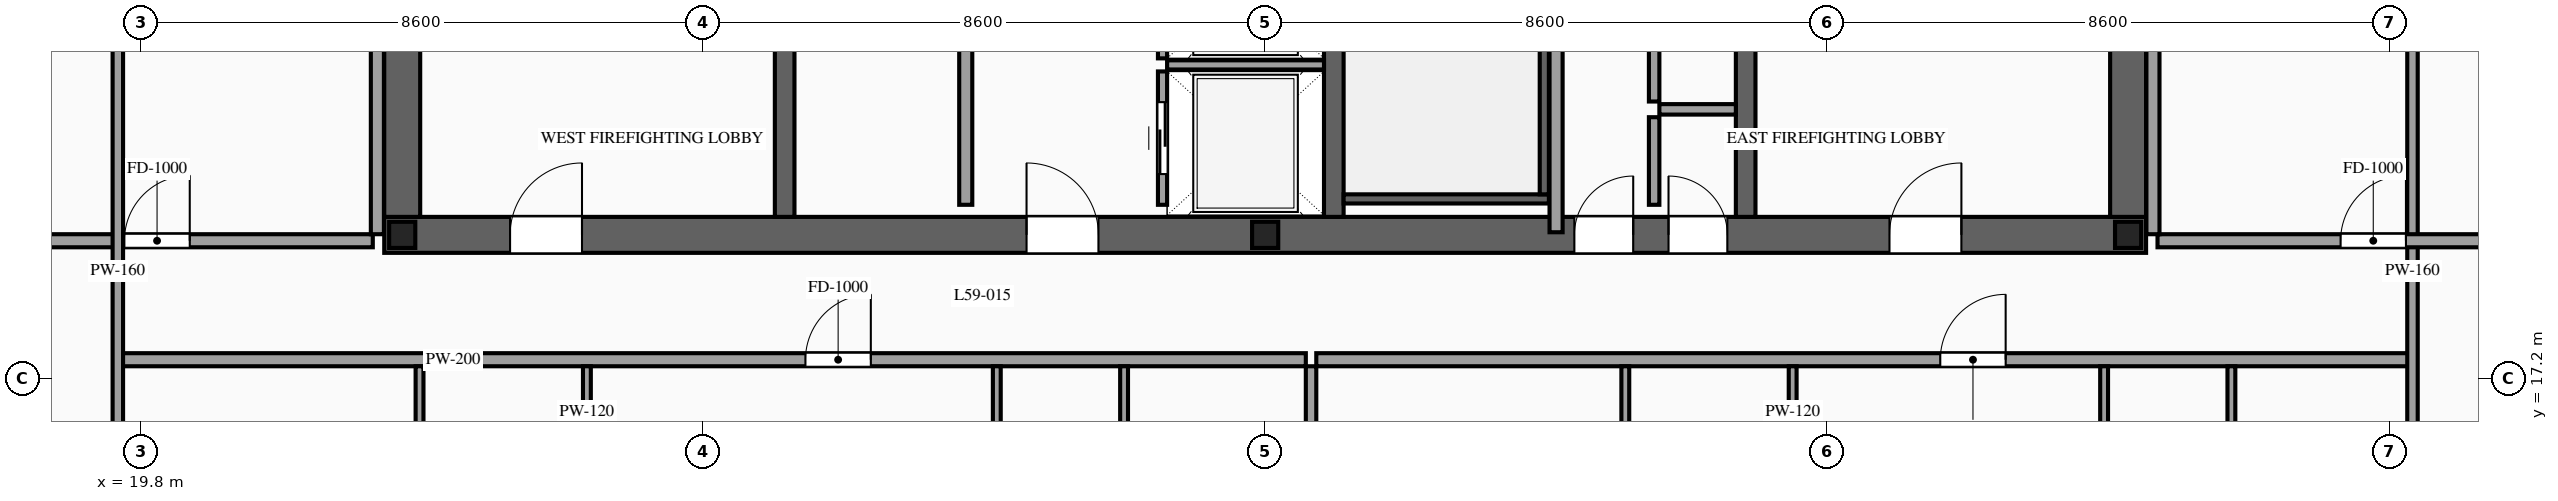
"""IFC4 building model, lengths in metres.
Left out: names, types, materials, properties, quantities, classifications, styles, units other than length and angle.
Written with IfcOpenShell. Run it as: python <this file> out.ifc"""

import sys

from ifc_helpers import new_model, si_unit, direction, frame, frame_2d, origin, origin_2d, place, context, subcontext, project, spatial, rectangle, i_section, extrude, source, transform, mapped, element, fill, save


model = new_model("IFC4")
c1 = context("Model", 3, precision=1e-05, world=origin(), true_north=direction((0.0, 1.0)))
c2 = subcontext(c1, "Body", "Model", "MODEL_VIEW")
j1 = project(units=[si_unit("LENGTHUNIT", "METRE"), si_unit("PLANEANGLEUNIT", "RADIAN")], contexts=[c1])
p1 = place(None, origin())
s1 = spatial("IfcSite", under=j1, at=p1, CompositionType="ELEMENT")
p2 = place(p1, origin())
s2 = spatial("IfcBuilding", under=s1, at=p2, CompositionType="ELEMENT")
p3 = place(p2, frame((0.0, 0.0, 224.1)))
s3 = spatial("IfcBuildingStorey", under=s2, at=p3, CompositionType="ELEMENT", Elevation=224.1)
p4 = place(p3, frame((23.525, 19.4, 0.0), z_axis=(0.0, 0.0, 1.0), x_axis=(1.0, 0.0, 0.0)))
e1 = element("IfcWall", 1, at=p4, inside=s3, PredefinedType="SHEAR", context=c2, shape_type="SweptSolid", body=[
    extrude(rectangle(XDim=26.95, YDim=0.55, at=frame_2d((13.475, 0.0))), origin(), (0.0, 0.0, 1.0), 3.5),
])
p5 = place(p4, frame((1.925, 0.0, 0.0)))
e2 = element("IfcOpeningElement", 2, at=p5, cuts=e1, PredefinedType="OPENING", context=c2, shape_type="SweptSolid", body=[
    extrude(rectangle(XDim=1.1, YDim=2.2, at=frame_2d((0.55, 1.1))), frame((0.0, 0.29, 0.0), z_axis=(0.0, -1.0, 0.0), x_axis=(1.0, 0.0, 0.0)), (0.0, 0.0, 1.0), 0.58),
])
p6 = place(p4, frame((9.825, 0.0, 0.0)))
e3 = element("IfcOpeningElement", 3, at=p6, cuts=e1, PredefinedType="OPENING", context=c2, shape_type="SweptSolid", body=[
    extrude(rectangle(XDim=1.1, YDim=2.2, at=frame_2d((0.55, 1.1))), frame((0.0, 0.29, 0.0), z_axis=(0.0, -1.0, 0.0), x_axis=(1.0, 0.0, 0.0)), (0.0, 0.0, 1.0), 0.58),
])
p7 = place(p4, frame((23.025, 0.0, 0.0)))
e4 = element("IfcOpeningElement", 4, at=p7, cuts=e1, PredefinedType="OPENING", context=c2, shape_type="SweptSolid", body=[
    extrude(rectangle(XDim=1.1, YDim=2.2, at=frame_2d((0.55, 1.1))), frame((0.0, 0.29, 0.0), z_axis=(0.0, -1.0, 0.0), x_axis=(1.0, 0.0, 0.0)), (0.0, 0.0, 1.0), 0.58),
])
p8 = place(p4, frame((19.645, 0.0, 0.0)))
e5 = element("IfcOpeningElement", 5, at=p8, cuts=e1, PredefinedType="OPENING", context=c2, shape_type="SweptSolid", body=[
    extrude(rectangle(XDim=0.9, YDim=2.15, at=frame_2d((0.45, 1.075))), frame((0.0, 0.29, 0.0), z_axis=(0.0, -1.0, 0.0), x_axis=(1.0, 0.0, 0.0)), (0.0, 0.0, 1.0), 0.58),
])
p9 = place(p4, frame((18.205, 0.0, 0.0)))
e6 = element("IfcOpeningElement", 6, at=p9, cuts=e1, PredefinedType="OPENING", context=c2, shape_type="SweptSolid", body=[
    extrude(rectangle(XDim=0.9, YDim=2.15, at=frame_2d((0.45, 1.075))), frame((0.0, 0.29, 0.0), z_axis=(0.0, -1.0, 0.0), x_axis=(1.0, 0.0, 0.0)), (0.0, 0.0, 1.0), 0.58),
])
m1 = source(origin(), c2, "Body", "SweptSolid", [
    extrude(rectangle(XDim=12.25, YDim=0.55, at=frame_2d((6.125, 0.0))), origin(), (0.0, 0.0, 1.0), 3.5),
])
for number, where, z_axis, x_axis in (
    (7, (23.8, 19.675, 0.0), (0.0, 0.0, 1.0), (0.0, 1.0, 0.0)),
    (8, (50.2, 19.675, 0.0), (0.0, 0.0, 1.0), (0.0, 1.0, 0.0)),
):
    element("IfcWall", number, at=place(p3, frame(where, z_axis=z_axis, x_axis=x_axis)), inside=s3, PredefinedType="SHEAR", context=c2, shape_type="MappedRepresentation", body=[
        mapped(m1, transform((0.0, 0.0, 0.0), scale=1.0)),
    ])
m2 = source(origin(), c2, "Body", "SweptSolid", [
    extrude(rectangle(XDim=12.25, YDim=0.3, at=frame_2d((6.125, 0.0))), origin(), (0.0, 0.0, 1.0), 3.5),
])
for number, where, z_axis, x_axis in (
    (9, (29.65, 19.675, 0.0), (0.0, 0.0, 1.0), (0.0, 1.0, 0.0)),
    (10, (38.05, 19.675, 0.0), (0.0, 0.0, 1.0), (0.0, 1.0, 0.0)),
    (11, (44.35, 19.675, 0.0), (0.0, 0.0, 1.0), (0.0, 1.0, 0.0)),
):
    element("IfcWall", number, at=place(p3, frame(where, z_axis=z_axis, x_axis=x_axis)), inside=s3, PredefinedType="SOLIDWALL", context=c2, shape_type="MappedRepresentation", body=[
        mapped(m2, transform((0.0, 0.0, 0.0), scale=1.0)),
    ])
m3 = source(origin(), c2, "Body", "SweptSolid", [
    extrude(i_section(OverallWidth=0.4, OverallDepth=0.4, WebThickness=0.013, FlangeThickness=0.021, at=origin_2d()), origin(), (0.0, 0.0, 1.0), 3.5),
])
for number, where, z_axis, x_axis in (
    (12, (23.8, 19.4, 0.0), (0.0, 0.0, 1.0), (1.0, 0.0, 0.0)),
    (13, (37.0, 19.4, 0.0), (0.0, 0.0, 1.0), (1.0, 0.0, 0.0)),
    (14, (50.2, 19.4, 0.0), (0.0, 0.0, 1.0), (1.0, 0.0, 0.0)),
):
    element("IfcColumn", number, at=place(p3, frame(where, z_axis=z_axis, x_axis=x_axis)), inside=s3, PredefinedType="COLUMN", context=c2, shape_type="MappedRepresentation", body=[
        mapped(m3, transform((0.0, 0.0, 0.0), scale=1.0)),
    ])
p10 = place(p3, frame((35.43, 19.86, 0.0), z_axis=(0.0, 0.0, 1.0), x_axis=(0.0, 1.0, 0.0)))
e15 = element("IfcWall", 15, at=p10, inside=s3, PredefinedType="SOLIDWALL", context=c2, shape_type="SweptSolid", body=[
    extrude(rectangle(XDim=2.04, YDim=0.14, at=frame_2d((1.02, 0.0))), origin(), (0.0, 0.0, 1.0), 3.28),
])
p11 = place(p10, frame((0.47, 0.0, 0.0)))
e16 = element("IfcOpeningElement", 16, at=p11, cuts=e15, PredefinedType="OPENING", context=c2, shape_type="SweptSolid", body=[
    extrude(rectangle(XDim=1.1, YDim=2.2, at=frame_2d((0.55, 1.1))), frame((0.0, 0.085, 0.0), z_axis=(0.0, -1.0, 0.0), x_axis=(1.0, 0.0, 0.0)), (0.0, 0.0, 1.0), 0.17),
])
m4 = source(origin(), c2, "Body", "SweptSolid", [
    extrude(rectangle(XDim=2.4, YDim=0.14, at=frame_2d((1.2, 0.0))), origin(), (0.0, 0.0, 1.0), 3.28),
])
p12 = place(p3, frame((35.5, 22.0, 0.0), z_axis=(0.0, 0.0, 1.0), x_axis=(1.0, 0.0, 0.0)))
e17 = element("IfcWall", 17, at=p12, inside=s3, PredefinedType="SOLIDWALL", context=c2, shape_type="MappedRepresentation", body=[
    mapped(m4, transform((0.0, 0.0, 0.0), scale=1.0)),
])
p13 = place(p3, frame((35.43, 22.1, 0.0), z_axis=(0.0, 0.0, 1.0), x_axis=(0.0, 1.0, 0.0)))
e18 = element("IfcWall", 18, at=p13, inside=s3, PredefinedType="SOLIDWALL", context=c2, shape_type="SweptSolid", body=[
    extrude(rectangle(XDim=2.2, YDim=0.14, at=frame_2d((1.1, 0.0))), origin(), (0.0, 0.0, 1.0), 3.28),
])
p14 = place(p13, frame((0.55, 0.0, 0.0)))
e19 = element("IfcOpeningElement", 19, at=p14, cuts=e18, PredefinedType="OPENING", context=c2, shape_type="SweptSolid", body=[
    extrude(rectangle(XDim=1.1, YDim=2.2, at=frame_2d((0.55, 1.1))), frame((0.0, 0.085, 0.0), z_axis=(0.0, -1.0, 0.0), x_axis=(1.0, 0.0, 0.0)), (0.0, 0.0, 1.0), 0.17),
])
m5 = source(origin(), c2, "Body", "SweptSolid", [
    extrude(rectangle(XDim=3.14, YDim=0.14, at=frame_2d((1.57, 0.0))), origin(), (0.0, 0.0, 1.0), 3.28),
])
p15 = place(p3, frame((38.2, 19.95, 0.0), z_axis=(0.0, 0.0, 1.0), x_axis=(1.0, 0.0, 0.0)))
e20 = element("IfcWall", 20, at=p15, inside=s3, PredefinedType="SOLIDWALL", context=c2, shape_type="MappedRepresentation", body=[
    mapped(m5, transform((0.0, 0.0, 0.0), scale=1.0)),
])
m6 = source(origin(), c2, "Body", "SweptSolid", [
    extrude(rectangle(XDim=8.94, YDim=0.14, at=frame_2d((4.47, 0.0))), origin(), (0.0, 0.0, 1.0), 3.28),
])
p16 = place(p3, frame((41.27, 20.02, 0.0), z_axis=(0.0, 0.0, 1.0), x_axis=(0.0, 1.0, 0.0)))
e21 = element("IfcWall", 21, at=p16, inside=s3, PredefinedType="SOLIDWALL", context=c2, shape_type="MappedRepresentation", body=[
    mapped(m6, transform((0.0, 0.0, 0.0), scale=1.0)),
])
p17 = place(p3, frame((32.42, 19.86, 0.0), z_axis=(0.0, 0.0, 1.0), x_axis=(0.0, 1.0, 0.0)))
e22 = element("IfcWall", 22, at=p17, inside=s3, PredefinedType="PARTITIONING", context=c2, shape_type="SweptSolid", body=[
    extrude(rectangle(XDim=5.84, YDim=0.2, at=frame_2d((2.92, 0.0))), origin(), (0.0, 0.0, 1.0), 3.28),
])
p18 = place(p17, frame((2.47, 0.0, 0.0)))
e23 = element("IfcOpeningElement", 23, at=p18, cuts=e22, PredefinedType="OPENING", context=c2, shape_type="SweptSolid", body=[
    extrude(rectangle(XDim=0.9, YDim=2.15, at=frame_2d((0.45, 1.075))), frame((0.0, 0.115, 0.0), z_axis=(0.0, -1.0, 0.0), x_axis=(1.0, 0.0, 0.0)), (0.0, 0.0, 1.0), 0.23),
])
m7 = source(origin(), c2, "Body", "SweptSolid", [
    extrude(rectangle(XDim=1.34, YDim=0.16, at=frame_2d((0.67, 0.0))), origin(), (0.0, 0.0, 1.0), 3.28),
])
p19 = place(p3, frame((42.95, 19.86, 0.0), z_axis=(0.0, 0.0, 1.0), x_axis=(0.0, 1.0, 0.0)))
e24 = element("IfcWall", 24, at=p19, inside=s3, PredefinedType="PARTITIONING", context=c2, shape_type="MappedRepresentation", body=[
    mapped(m7, transform((0.0, 0.0, 0.0), scale=1.0)),
])
m8 = source(origin(), c2, "Body", "SweptSolid", [
    extrude(rectangle(XDim=1.17, YDim=0.16, at=frame_2d((0.585, 0.0))), origin(), (0.0, 0.0, 1.0), 3.28),
])
p20 = place(p3, frame((43.03, 21.32, 0.0), z_axis=(0.0, 0.0, 1.0), x_axis=(1.0, 0.0, 0.0)))
e25 = element("IfcWall", 25, at=p20, inside=s3, PredefinedType="PARTITIONING", context=c2, shape_type="MappedRepresentation", body=[
    mapped(m8, transform((0.0, 0.0, 0.0), scale=1.0)),
])
m9 = source(origin(), c2, "Body", "SweptSolid", [
    extrude(rectangle(XDim=12.72, YDim=0.2, at=frame_2d((6.36, 0.0))), origin(), (0.0, 0.0, 1.0), 3.28),
])
p21 = place(p3, frame((41.45, 19.44, 0.0), z_axis=(0.0, 0.0, 1.0), x_axis=(0.0, 1.0, 0.0)))
e26 = element("IfcWall", 26, at=p21, inside=s3, PredefinedType="PARTITIONING", context=c2, shape_type="MappedRepresentation", body=[
    mapped(m9, transform((0.0, 0.0, 0.0), scale=1.0)),
])
m10 = source(origin(), c2, "Body", "SweptSolid", [
    extrude(rectangle(XDim=10.72, YDim=0.16, at=frame_2d((5.36, 0.0))), origin(), (0.0, 0.0, 1.0), 3.28),
])
p22 = place(p3, frame((42.95, 21.44, 0.0), z_axis=(0.0, 0.0, 1.0), x_axis=(0.0, 1.0, 0.0)))
e27 = element("IfcWall", 27, at=p22, inside=s3, PredefinedType="PARTITIONING", context=c2, shape_type="MappedRepresentation", body=[
    mapped(m10, transform((0.0, 0.0, 0.0), scale=1.0)),
])
p23 = place(p3, frame((19.44, 17.49, 0.0), z_axis=(0.0, 0.0, 1.0), x_axis=(1.0, 0.0, 0.0)))
e28 = element("IfcWall", 28, at=p23, inside=s3, PredefinedType="PARTITIONING", context=c2, shape_type="SweptSolid", body=[
    extrude(rectangle(XDim=18.182, YDim=0.2, at=frame_2d((9.091, 0.0))), origin(), (0.0, 0.0, 1.0), 3.28),
])
p24 = place(p23, frame((10.528, 0.0, 0.0)))
e29 = element("IfcOpeningElement", 29, at=p24, cuts=e28, PredefinedType="OPENING", context=c2, shape_type="SweptSolid", body=[
    extrude(rectangle(XDim=1.0, YDim=2.2, at=frame_2d((0.5, 1.1))), frame((0.0, 0.115, 0.0), z_axis=(0.0, -1.0, 0.0), x_axis=(1.0, 0.0, 0.0)), (0.0, 0.0, 1.0), 0.23),
])
m11 = source(origin(), c2, "Body", "SweptSolid", [
    extrude(rectangle(XDim=12.04, YDim=0.16, at=frame_2d((6.02, 0.0))), origin(), (0.0, 0.0, 1.0), 3.28),
])
p25 = place(p3, frame((37.702, 5.35, 0.0), z_axis=(0.0, 0.0, 1.0), x_axis=(0.0, 1.0, 0.0)))
e30 = element("IfcWall", 30, at=p25, inside=s3, PredefinedType="PARTITIONING", context=c2, shape_type="MappedRepresentation", body=[
    mapped(m11, transform((0.0, 0.0, 0.0), scale=1.0)),
])
m12 = source(origin(), c2, "Body", "SweptSolid", [
    extrude(rectangle(XDim=4.11, YDim=0.12, at=frame_2d((2.055, 0.0))), origin(), (0.0, 0.0, 1.0), 3.28),
])
p26 = place(p3, frame((24.065, 13.28, 0.0), z_axis=(0.0, 0.0, 1.0), x_axis=(0.0, 1.0, 0.0)))
e31 = element("IfcWall", 31, at=p26, inside=s3, PredefinedType="PARTITIONING", context=c2, shape_type="MappedRepresentation", body=[
    mapped(m12, transform((0.0, 0.0, 0.0), scale=1.0)),
])
p27 = place(p3, frame((26.625, 13.28, 0.0), z_axis=(0.0, 0.0, 1.0), x_axis=(0.0, 1.0, 0.0)))
e32 = element("IfcWall", 32, at=p27, inside=s3, PredefinedType="PARTITIONING", context=c2, shape_type="SweptSolid", body=[
    extrude(rectangle(XDim=4.11, YDim=0.12, at=frame_2d((2.055, 0.0))), origin(), (0.0, 0.0, 1.0), 3.28),
])
p28 = place(p27, frame((1.63, 0.0, 0.0)))
e33 = element("IfcOpeningElement", 33, at=p28, cuts=e32, PredefinedType="OPENING", context=c2, shape_type="SweptSolid", body=[
    extrude(rectangle(XDim=0.85, YDim=2.1, at=frame_2d((0.425, 1.05))), frame((0.0, 0.075, 0.0), z_axis=(0.0, -1.0, 0.0), x_axis=(1.0, 0.0, 0.0)), (0.0, 0.0, 1.0), 0.15),
])
for number, where, z_axis, x_axis in (
    (34, (34.842, 13.28, 0.0), (0.0, 0.0, 1.0), (0.0, 1.0, 0.0)),
    (35, (32.895, 13.28, 0.0), (0.0, 0.0, 1.0), (0.0, 1.0, 0.0)),
):
    element("IfcWall", number, at=place(p3, frame(where, z_axis=z_axis, x_axis=x_axis)), inside=s3, PredefinedType="PARTITIONING", context=c2, shape_type="MappedRepresentation", body=[
        mapped(m12, transform((0.0, 0.0, 0.0), scale=1.0)),
    ])
p29 = place(p3, frame((37.782, 17.49, 0.0), z_axis=(0.0, 0.0, 1.0), x_axis=(1.0, 0.0, 0.0)))
e36 = element("IfcWall", 36, at=p29, inside=s3, PredefinedType="PARTITIONING", context=c2, shape_type="SweptSolid", body=[
    extrude(rectangle(XDim=16.778, YDim=0.2, at=frame_2d((8.389, 0.0))), origin(), (0.0, 0.0, 1.0), 3.28),
])
p30 = place(p29, frame((9.545, 0.0, 0.0)))
e37 = element("IfcOpeningElement", 37, at=p30, cuts=e36, PredefinedType="OPENING", context=c2, shape_type="SweptSolid", body=[
    extrude(rectangle(XDim=1.0, YDim=2.2, at=frame_2d((0.5, 1.1))), frame((0.0, 0.115, 0.0), z_axis=(0.0, -1.0, 0.0), x_axis=(1.0, 0.0, 0.0)), (0.0, 0.0, 1.0), 0.23),
])
p31 = place(p3, frame((42.509, 13.28, 0.0), z_axis=(0.0, 0.0, 1.0), x_axis=(0.0, 1.0, 0.0)))
e38 = element("IfcWall", 38, at=p31, inside=s3, PredefinedType="PARTITIONING", context=c2, shape_type="MappedRepresentation", body=[
    mapped(m12, transform((0.0, 0.0, 0.0), scale=1.0)),
])
p32 = place(p3, frame((45.069, 13.28, 0.0), z_axis=(0.0, 0.0, 1.0), x_axis=(0.0, 1.0, 0.0)))
e39 = element("IfcWall", 39, at=p32, inside=s3, PredefinedType="PARTITIONING", context=c2, shape_type="SweptSolid", body=[
    extrude(rectangle(XDim=4.11, YDim=0.12, at=frame_2d((2.055, 0.0))), origin(), (0.0, 0.0, 1.0), 3.28),
])
p33 = place(p32, frame((1.63, 0.0, 0.0)))
e40 = element("IfcOpeningElement", 40, at=p33, cuts=e39, PredefinedType="OPENING", context=c2, shape_type="SweptSolid", body=[
    extrude(rectangle(XDim=0.85, YDim=2.1, at=frame_2d((0.425, 1.05))), frame((0.0, 0.075, 0.0), z_axis=(0.0, -1.0, 0.0), x_axis=(1.0, 0.0, 0.0)), (0.0, 0.0, 1.0), 0.15),
])
for number, where, z_axis, x_axis in (
    (41, (51.78, 13.28, 0.0), (0.0, 0.0, 1.0), (0.0, 1.0, 0.0)),
    (42, (49.833, 13.28, 0.0), (0.0, 0.0, 1.0), (0.0, 1.0, 0.0)),
):
    element("IfcWall", number, at=place(p3, frame(where, z_axis=z_axis, x_axis=x_axis)), inside=s3, PredefinedType="PARTITIONING", context=c2, shape_type="MappedRepresentation", body=[
        mapped(m12, transform((0.0, 0.0, 0.0), scale=1.0)),
    ])
p34 = place(p3, frame((16.55, 19.31, 0.0), z_axis=(0.0, 0.0, 1.0), x_axis=(1.0, 0.0, 0.0)))
e43 = element("IfcWall", 43, at=p34, inside=s3, PredefinedType="PARTITIONING", context=c2, shape_type="SweptSolid", body=[
    extrude(rectangle(XDim=6.8, YDim=0.2, at=frame_2d((3.4, 0.0))), origin(), (0.0, 0.0, 1.0), 2.825),
])
p35 = place(p34, frame((3.0, 0.0, 0.0)))
e44 = element("IfcOpeningElement", 44, at=p35, cuts=e43, PredefinedType="OPENING", context=c2, shape_type="SweptSolid", body=[
    extrude(rectangle(XDim=1.0, YDim=2.2, at=frame_2d((0.5, 1.1))), frame((0.0, 0.115, 0.0), z_axis=(0.0, -1.0, 0.0), x_axis=(1.0, 0.0, 0.0)), (0.0, 0.0, 1.0), 0.23),
])
m13 = source(origin(), c2, "Body", "SweptSolid", [
    extrude(rectangle(XDim=6.29, YDim=0.2, at=frame_2d((3.145, 0.0))), origin(), (0.0, 0.0, 1.0), 3.28),
])
p36 = place(p3, frame((23.42, 19.41, 0.0), z_axis=(0.0, 0.0, 1.0), x_axis=(0.0, 1.0, 0.0)))
e45 = element("IfcWall", 45, at=p36, inside=s3, PredefinedType="PARTITIONING", context=c2, shape_type="MappedRepresentation", body=[
    mapped(m13, transform((0.0, 0.0, 0.0), scale=1.0)),
])
m14 = source(origin(), c2, "Body", "SweptSolid", [
    extrude(rectangle(XDim=26.69, YDim=0.16, at=frame_2d((13.345, 0.0))), origin(), (0.0, 0.0, 1.0), 3.28),
])
for number, where, z_axis, x_axis in (
    (46, (19.45, 5.5, 0.0), (0.0, 0.0, 1.0), (0.0, 1.0, 0.0)),
    (47, (54.55, 5.5, 0.0), (0.0, 0.0, 1.0), (0.0, 1.0, 0.0)),
):
    element("IfcWall", number, at=place(p3, frame(where, z_axis=z_axis, x_axis=x_axis)), inside=s3, PredefinedType="PARTITIONING", context=c2, shape_type="MappedRepresentation", body=[
        mapped(m14, transform((0.0, 0.0, 0.0), scale=1.0)),
    ])
p37 = place(p3, frame((50.65, 19.31, 0.0), z_axis=(0.0, 0.0, 1.0), x_axis=(1.0, 0.0, 0.0)))
e48 = element("IfcWall", 48, at=p37, inside=s3, PredefinedType="PARTITIONING", context=c2, shape_type="SweptSolid", body=[
    extrude(rectangle(XDim=6.8, YDim=0.2, at=frame_2d((3.4, 0.0))), origin(), (0.0, 0.0, 1.0), 2.825),
])
p38 = place(p37, frame((2.8, 0.0, 0.0)))
e49 = element("IfcOpeningElement", 49, at=p38, cuts=e48, PredefinedType="OPENING", context=c2, shape_type="SweptSolid", body=[
    extrude(rectangle(XDim=1.0, YDim=2.2, at=frame_2d((0.5, 1.1))), frame((0.0, 0.115, 0.0), z_axis=(0.0, -1.0, 0.0), x_axis=(1.0, 0.0, 0.0)), (0.0, 0.0, 1.0), 0.23),
])
p39 = place(p3, frame((50.58, 19.41, 0.0), z_axis=(0.0, 0.0, 1.0), x_axis=(0.0, 1.0, 0.0)))
e50 = element("IfcWall", 50, at=p39, inside=s3, PredefinedType="PARTITIONING", context=c2, shape_type="MappedRepresentation", body=[
    mapped(m13, transform((0.0, 0.0, 0.0), scale=1.0)),
])
m15 = source(origin(), c2, "Body", "SweptSolid", [
    extrude(rectangle(XDim=1.1, YDim=2.2, at=frame_2d((0.55, 1.1))), frame((0.0, 0.025, 0.0), z_axis=(0.0, -1.0, 0.0), x_axis=(1.0, 0.0, 0.0)), (0.0, 0.0, 1.0), 0.05),
])
p40 = place(p11, origin())
e51 = element("IfcDoor", 51, at=p40, inside=s3, OperationType="SLIDING_TO_RIGHT", PredefinedType="DOOR", context=c2, shape_type="MappedRepresentation", body=[
    mapped(m15, transform((0.0, 0.0, 0.0), scale=1.0)),
])
fill(e16, e51)
m16 = source(origin(), c2, "Body", "SweptSolid", [
    extrude(rectangle(XDim=1.1, YDim=2.2, at=frame_2d((0.55, 1.1))), frame((0.0, 0.025, 0.0), z_axis=(0.0, -1.0, 0.0), x_axis=(1.0, 0.0, 0.0)), (0.0, 0.0, 1.0), 0.05),
])
p41 = place(p5, origin())
e52 = element("IfcDoor", 52, at=p41, inside=s3, OperationType="SINGLE_SWING_RIGHT", PredefinedType="DOOR", context=c2, shape_type="MappedRepresentation", body=[
    mapped(m16, transform((0.0, 0.0, 0.0), scale=1.0)),
])
fill(e2, e52)
p42 = place(p6, origin())
e53 = element("IfcDoor", 53, at=p42, inside=s3, OperationType="SINGLE_SWING_LEFT", PredefinedType="DOOR", context=c2, shape_type="MappedRepresentation", body=[
    mapped(m16, transform((0.0, 0.0, 0.0), scale=1.0)),
])
fill(e3, e53)
p43 = place(p7, origin())
e54 = element("IfcDoor", 54, at=p43, inside=s3, OperationType="SINGLE_SWING_RIGHT", PredefinedType="DOOR", context=c2, shape_type="MappedRepresentation", body=[
    mapped(m16, transform((0.0, 0.0, 0.0), scale=1.0)),
])
fill(e4, e54)
m17 = source(origin(), c2, "Body", "SweptSolid", [
    extrude(rectangle(XDim=0.9, YDim=2.15, at=frame_2d((0.45, 1.075))), frame((0.0, 0.025, 0.0), z_axis=(0.0, -1.0, 0.0), x_axis=(1.0, 0.0, 0.0)), (0.0, 0.0, 1.0), 0.05),
])
p44 = place(p8, origin())
e55 = element("IfcDoor", 55, at=p44, inside=s3, OperationType="SINGLE_SWING_LEFT", PredefinedType="DOOR", context=c2, shape_type="MappedRepresentation", body=[
    mapped(m17, transform((0.0, 0.0, 0.0), scale=1.0)),
])
fill(e5, e55)
p45 = place(p9, origin())
e56 = element("IfcDoor", 56, at=p45, inside=s3, OperationType="SINGLE_SWING_RIGHT", PredefinedType="DOOR", context=c2, shape_type="MappedRepresentation", body=[
    mapped(m17, transform((0.0, 0.0, 0.0), scale=1.0)),
])
fill(e6, e56)
m18 = source(origin(), c2, "Body", "SweptSolid", [
    extrude(rectangle(XDim=1.0, YDim=2.2, at=frame_2d((0.5, 1.1))), frame((0.0, 0.025, 0.0), z_axis=(0.0, -1.0, 0.0), x_axis=(1.0, 0.0, 0.0)), (0.0, 0.0, 1.0), 0.05),
])
p46 = place(p24, origin())
e57 = element("IfcDoor", 57, at=p46, inside=s3, OperationType="SINGLE_SWING_RIGHT", PredefinedType="DOOR", context=c2, shape_type="MappedRepresentation", body=[
    mapped(m18, transform((0.0, 0.0, 0.0), scale=1.0)),
])
fill(e29, e57)
p47 = place(p30, origin())
e58 = element("IfcDoor", 58, at=p47, inside=s3, OperationType="SINGLE_SWING_RIGHT", PredefinedType="DOOR", context=c2, shape_type="MappedRepresentation", body=[
    mapped(m18, transform((0.0, 0.0, 0.0), scale=1.0)),
])
fill(e37, e58)
p48 = place(p35, origin())
e59 = element("IfcDoor", 59, at=p48, inside=s3, OperationType="SINGLE_SWING_RIGHT", PredefinedType="DOOR", context=c2, shape_type="MappedRepresentation", body=[
    mapped(m18, transform((0.0, 0.0, 0.0), scale=1.0)),
])
fill(e44, e59)
p49 = place(p38, origin())
e60 = element("IfcDoor", 60, at=p49, inside=s3, OperationType="SINGLE_SWING_RIGHT", PredefinedType="DOOR", context=c2, shape_type="MappedRepresentation", body=[
    mapped(m18, transform((0.0, 0.0, 0.0), scale=1.0)),
])
fill(e49, e60)
save(model, sys.argv[1])
